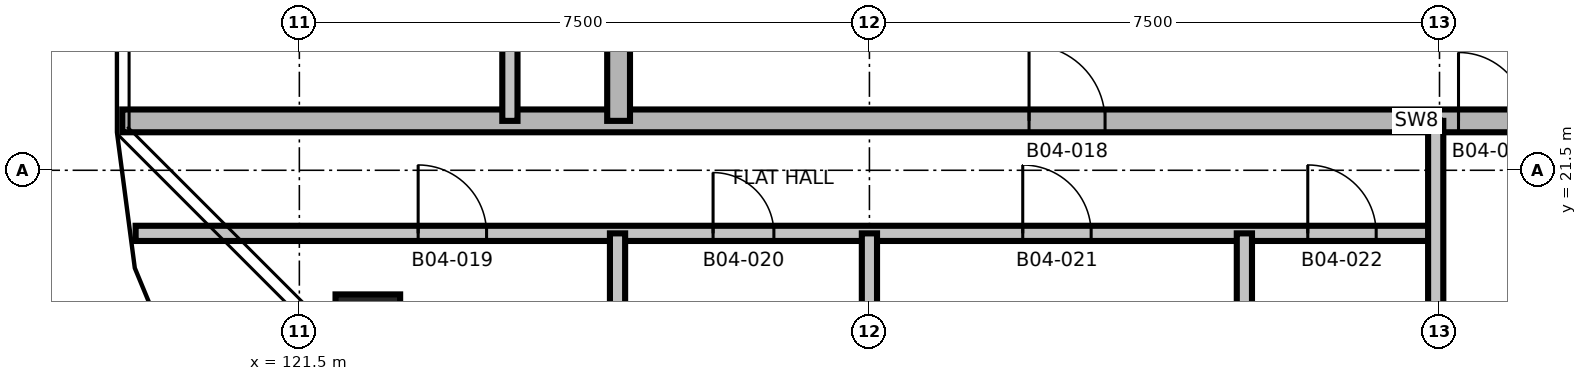
"""IFC4 building model, lengths in metres.
Left out: names, types, materials, properties, quantities, classifications, styles, units other than length and angle.
Written with IfcOpenShell. Run it as: python <this file> out.ifc"""

import sys

from ifc_helpers import new_model, si_unit, direction, frame, frame_2d, origin, origin_2d, place, context, subcontext, project, spatial, rectangle, extrude, element, fill, save


model = new_model("IFC4")
c1 = context("Model", 3, precision=1e-05, world=origin(), true_north=direction((0.0, 1.0)))
c2 = subcontext(c1, "Body", "Model", "MODEL_VIEW")
j1 = project(units=[si_unit("LENGTHUNIT", "METRE"), si_unit("PLANEANGLEUNIT", "RADIAN")], contexts=[c1])
p1 = place(None, origin())
s1 = spatial("IfcSite", under=j1, at=p1, CompositionType="ELEMENT")
p2 = place(p1, origin())
s2 = spatial("IfcBuilding", under=s1, at=p2, CompositionType="ELEMENT")
p3 = place(p2, frame((0.0, 0.0, 66.8)))
s3 = spatial("IfcBuildingStorey", under=s2, at=p3, CompositionType="ELEMENT", Elevation=66.8)
p4 = place(p3, frame((122.401, 19.442, 0.0), z_axis=(0.0, 0.0, 1.0), x_axis=(1.0, 0.0, 0.0)))
e1 = element("IfcColumn", 1, at=p4, inside=s3, PredefinedType="COLUMN", context=c2, shape_type="SweptSolid", body=[
    extrude(rectangle(XDim=0.85, YDim=0.85, at=origin_2d()), origin(), (0.0, 0.0, 1.0), 3.7),
])
p5 = place(p3, frame((119.346, 20.67, 0.0), z_axis=(0.0, 0.0, 1.0), x_axis=(1.0, 0.0, 0.0)))
e2 = element("IfcWall", 2, at=p5, inside=s3, PredefinedType="PARTITIONING", context=c2, shape_type="SweptSolid", body=[
    extrude(rectangle(XDim=17.154, YDim=0.2, at=frame_2d((8.577, 0.0))), origin(), (0.0, 0.0, 1.0), 3.4),
])
p6 = place(p5, frame((3.717, 0.0, 0.0)))
e3 = element("IfcOpeningElement", 3, at=p6, cuts=e2, PredefinedType="OPENING", context=c2, shape_type="SweptSolid", body=[
    extrude(rectangle(XDim=0.9, YDim=2.1, at=frame_2d((0.45, 1.05))), frame((0.0, 0.11, 0.0), z_axis=(0.0, -1.0, 0.0), x_axis=(1.0, 0.0, 0.0)), (0.0, 0.0, 1.0), 0.22),
])
p7 = place(p5, frame((7.597, 0.0, 0.0)))
e4 = element("IfcOpeningElement", 4, at=p7, cuts=e2, PredefinedType="OPENING", context=c2, shape_type="SweptSolid", body=[
    extrude(rectangle(XDim=0.8, YDim=2.1, at=frame_2d((0.4, 1.05))), frame((0.0, 0.11, 0.0), z_axis=(0.0, -1.0, 0.0), x_axis=(1.0, 0.0, 0.0)), (0.0, 0.0, 1.0), 0.22),
])
p8 = place(p5, frame((11.671, 0.0, 0.0)))
e5 = element("IfcOpeningElement", 5, at=p8, cuts=e2, PredefinedType="OPENING", context=c2, shape_type="SweptSolid", body=[
    extrude(rectangle(XDim=0.9, YDim=2.1, at=frame_2d((0.45, 1.05))), frame((0.0, 0.11, 0.0), z_axis=(0.0, -1.0, 0.0), x_axis=(1.0, 0.0, 0.0)), (0.0, 0.0, 1.0), 0.22),
])
p9 = place(p5, frame((15.421, 0.0, 0.0)))
e6 = element("IfcOpeningElement", 6, at=p9, cuts=e2, PredefinedType="OPENING", context=c2, shape_type="SweptSolid", body=[
    extrude(rectangle(XDim=0.9, YDim=2.1, at=frame_2d((0.45, 1.05))), frame((0.0, 0.11, 0.0), z_axis=(0.0, -1.0, 0.0), x_axis=(1.0, 0.0, 0.0)), (0.0, 0.0, 1.0), 0.22),
])
p10 = place(p3, frame((119.17, 22.15, 0.0), z_axis=(0.0, 0.0, 1.0), x_axis=(1.0, 0.0, 0.0)))
e7 = element("IfcWall", 7, at=p10, inside=s3, PredefinedType="SHEAR", context=c2, shape_type="SweptSolid", body=[
    extrude(rectangle(XDim=34.66, YDim=0.3, at=frame_2d((17.33, 0.0))), origin(), (0.0, 0.0, 1.0), 3.4),
])
p11 = place(p10, frame((23.58, 0.0, 0.0)))
e8 = element("IfcOpeningElement", 8, at=p11, cuts=e7, PredefinedType="OPENING", context=c2, shape_type="SweptSolid", body=[
    extrude(rectangle(XDim=1.0, YDim=2.1, at=frame_2d((0.5, 1.05))), frame((0.0, 0.16, 0.0), z_axis=(0.0, -1.0, 0.0), x_axis=(1.0, 0.0, 0.0)), (0.0, 0.0, 1.0), 0.32),
])
p12 = place(p10, frame((11.93, 0.0, 0.0)))
e9 = element("IfcOpeningElement", 9, at=p12, cuts=e7, PredefinedType="OPENING", context=c2, shape_type="SweptSolid", body=[
    extrude(rectangle(XDim=1.0, YDim=2.1, at=frame_2d((0.5, 1.05))), frame((0.0, 0.16, 0.0), z_axis=(0.0, -1.0, 0.0), x_axis=(1.0, 0.0, 0.0)), (0.0, 0.0, 1.0), 0.32),
])
p13 = place(p10, frame((25.48, 0.0, 0.0)))
e10 = element("IfcOpeningElement", 10, at=p13, cuts=e7, PredefinedType="OPENING", context=c2, shape_type="SweptSolid", body=[
    extrude(rectangle(XDim=1.0, YDim=2.1, at=frame_2d((0.5, 1.05))), frame((0.0, 0.16, 0.0), z_axis=(0.0, -1.0, 0.0), x_axis=(1.0, 0.0, 0.0)), (0.0, 0.0, 1.0), 0.32),
])
p14 = place(p10, frame((17.58, 0.0, 0.0)))
e11 = element("IfcOpeningElement", 11, at=p14, cuts=e7, PredefinedType="OPENING", context=c2, shape_type="SweptSolid", body=[
    extrude(rectangle(XDim=0.9, YDim=2.1, at=frame_2d((0.45, 1.05))), frame((0.0, 0.16, 0.0), z_axis=(0.0, -1.0, 0.0), x_axis=(1.0, 0.0, 0.0)), (0.0, 0.0, 1.0), 0.32),
])
p15 = place(p3, frame((124.27, 22.15, 0.0), z_axis=(0.0, 0.0, 1.0), x_axis=(0.0, 1.0, 0.0)))
e12 = element("IfcWall", 12, at=p15, inside=s3, PredefinedType="PARTITIONING", context=c2, shape_type="SweptSolid", body=[
    extrude(rectangle(XDim=17.7, YDim=0.2, at=frame_2d((8.85, 0.0))), origin(), (0.0, 0.0, 1.0), 3.4),
])
p16 = place(p15, frame((1.725, 0.0, 0.0)))
e13 = element("IfcOpeningElement", 13, at=p16, cuts=e12, PredefinedType="OPENING", context=c2, shape_type="SweptSolid", body=[
    extrude(rectangle(XDim=0.9, YDim=2.1, at=frame_2d((0.45, 1.05))), frame((0.0, 0.11, 0.0), z_axis=(0.0, -1.0, 0.0), x_axis=(1.0, 0.0, 0.0)), (0.0, 0.0, 1.0), 0.22),
])
p17 = place(p15, frame((6.867, 0.0, 0.0)))
e14 = element("IfcOpeningElement", 14, at=p17, cuts=e12, PredefinedType="OPENING", context=c2, shape_type="SweptSolid", body=[
    extrude(rectangle(XDim=0.9, YDim=2.1, at=frame_2d((0.45, 1.05))), frame((0.0, 0.11, 0.0), z_axis=(0.0, -1.0, 0.0), x_axis=(1.0, 0.0, 0.0)), (0.0, 0.0, 1.0), 0.22),
])
p18 = place(p15, frame((11.367, 0.0, 0.0)))
e15 = element("IfcOpeningElement", 15, at=p18, cuts=e12, PredefinedType="OPENING", context=c2, shape_type="SweptSolid", body=[
    extrude(rectangle(XDim=0.9, YDim=2.1, at=frame_2d((0.45, 1.05))), frame((0.0, 0.11, 0.0), z_axis=(0.0, -1.0, 0.0), x_axis=(1.0, 0.0, 0.0)), (0.0, 0.0, 1.0), 0.22),
])
p19 = place(p15, frame((14.378, 0.0, 0.0)))
e16 = element("IfcOpeningElement", 16, at=p19, cuts=e12, PredefinedType="OPENING", context=c2, shape_type="SweptSolid", body=[
    extrude(rectangle(XDim=0.9, YDim=2.1, at=frame_2d((0.45, 1.05))), frame((0.0, 0.11, 0.0), z_axis=(0.0, -1.0, 0.0), x_axis=(1.0, 0.0, 0.0)), (0.0, 0.0, 1.0), 0.22),
])
p20 = place(p15, frame((16.603, 0.0, 0.0)))
e17 = element("IfcOpeningElement", 17, at=p20, cuts=e12, PredefinedType="OPENING", context=c2, shape_type="SweptSolid", body=[
    extrude(rectangle(XDim=0.8, YDim=2.1, at=frame_2d((0.4, 1.05))), frame((0.0, 0.11, 0.0), z_axis=(0.0, -1.0, 0.0), x_axis=(1.0, 0.0, 0.0)), (0.0, 0.0, 1.0), 0.22),
])
p21 = place(p3, frame((125.686, 15.212, 0.0), z_axis=(0.0, 0.0, 1.0), x_axis=(0.0, 1.0, 0.0)))
e18 = element("IfcWall", 18, at=p21, inside=s3, PredefinedType="PARTITIONING", context=c2, shape_type="SweptSolid", body=[
    extrude(rectangle(XDim=5.458, YDim=0.2, at=frame_2d((2.729, 0.0))), origin(), (0.0, 0.0, 1.0), 3.4),
])
p22 = place(p3, frame((125.7, 22.15, 0.0), z_axis=(0.0, 0.0, 1.0), x_axis=(0.0, 1.0, 0.0)))
e19 = element("IfcWall", 19, at=p22, inside=s3, PredefinedType="SHEAR", context=c2, shape_type="SweptSolid", body=[
    extrude(rectangle(XDim=17.7, YDim=0.3, at=frame_2d((8.85, 0.0))), origin(), (0.0, 0.0, 1.0), 3.4),
])
p23 = place(p22, frame((2.7, 0.0, 0.0)))
e20 = element("IfcOpeningElement", 20, at=p23, cuts=e19, PredefinedType="OPENING", context=c2, shape_type="SweptSolid", body=[
    extrude(rectangle(XDim=1.0, YDim=2.1, at=frame_2d((0.5, 1.05))), frame((0.0, 0.16, 0.0), z_axis=(0.0, -1.0, 0.0), x_axis=(1.0, 0.0, 0.0)), (0.0, 0.0, 1.0), 0.32),
])
for number, where, z_axis, x_axis in (
    (21, (129.0, 15.17, 0.0), (0.0, 0.0, 1.0), (0.0, 1.0, 0.0)),
    (22, (133.933, 15.17, 0.0), (0.0, 0.0, 1.0), (0.0, 1.0, 0.0)),
):
    element("IfcWall", number, at=place(p3, frame(where, z_axis=z_axis, x_axis=x_axis)), inside=s3, PredefinedType="PARTITIONING", context=c2, shape_type="SweptSolid", body=[
        extrude(rectangle(XDim=5.5, YDim=0.2, at=frame_2d((2.75, 0.0))), origin(), (0.0, 0.0, 1.0), 3.4),
    ])
p24 = place(p3, frame((136.45, 15.17, 0.0), z_axis=(0.0, 0.0, 1.0), x_axis=(0.0, 1.0, 0.0)))
e23 = element("IfcWall", 23, at=p24, inside=s3, PredefinedType="PARTITIONING", context=c2, shape_type="SweptSolid", body=[
    extrude(rectangle(XDim=6.98, YDim=0.2, at=frame_2d((3.49, 0.0))), origin(), (0.0, 0.0, 1.0), 3.4),
])
p25 = place(p12, origin())
e24 = element("IfcDoor", 24, at=p25, inside=s3, OperationType="SINGLE_SWING_RIGHT", PredefinedType="DOOR", context=c2, shape_type="SweptSolid", body=[
    extrude(rectangle(XDim=1.0, YDim=2.1, at=frame_2d((0.5, 1.05))), frame((0.0, 0.025, 0.0), z_axis=(0.0, -1.0, 0.0), x_axis=(1.0, 0.0, 0.0)), (0.0, 0.0, 1.0), 0.05),
])
fill(e9, e24)
p26 = place(p6, origin())
e25 = element("IfcDoor", 25, at=p26, inside=s3, OperationType="SINGLE_SWING_LEFT", PredefinedType="DOOR", context=c2, shape_type="SweptSolid", body=[
    extrude(rectangle(XDim=0.9, YDim=2.1, at=frame_2d((0.45, 1.05))), frame((0.0, 0.025, 0.0), z_axis=(0.0, -1.0, 0.0), x_axis=(1.0, 0.0, 0.0)), (0.0, 0.0, 1.0), 0.05),
])
fill(e3, e25)
p27 = place(p7, origin())
e26 = element("IfcDoor", 26, at=p27, inside=s3, OperationType="SINGLE_SWING_RIGHT", PredefinedType="DOOR", context=c2, shape_type="SweptSolid", body=[
    extrude(rectangle(XDim=0.8, YDim=2.1, at=frame_2d((0.4, 1.05))), frame((0.0, 0.025, 0.0), z_axis=(0.0, -1.0, 0.0), x_axis=(1.0, 0.0, 0.0)), (0.0, 0.0, 1.0), 0.05),
])
fill(e4, e26)
p28 = place(p8, origin())
e27 = element("IfcDoor", 27, at=p28, inside=s3, OperationType="SINGLE_SWING_LEFT", PredefinedType="DOOR", context=c2, shape_type="SweptSolid", body=[
    extrude(rectangle(XDim=0.9, YDim=2.1, at=frame_2d((0.45, 1.05))), frame((0.0, 0.025, 0.0), z_axis=(0.0, -1.0, 0.0), x_axis=(1.0, 0.0, 0.0)), (0.0, 0.0, 1.0), 0.05),
])
fill(e5, e27)
p29 = place(p9, origin())
e28 = element("IfcDoor", 28, at=p29, inside=s3, OperationType="SINGLE_SWING_RIGHT", PredefinedType="DOOR", context=c2, shape_type="SweptSolid", body=[
    extrude(rectangle(XDim=0.9, YDim=2.1, at=frame_2d((0.45, 1.05))), frame((0.0, 0.025, 0.0), z_axis=(0.0, -1.0, 0.0), x_axis=(1.0, 0.0, 0.0)), (0.0, 0.0, 1.0), 0.05),
])
fill(e6, e28)
p30 = place(p14, origin())
e29 = element("IfcDoor", 29, at=p30, inside=s3, OperationType="SINGLE_SWING_LEFT", PredefinedType="DOOR", context=c2, shape_type="SweptSolid", body=[
    extrude(rectangle(XDim=0.9, YDim=2.1, at=frame_2d((0.45, 1.05))), frame((0.0, 0.025, 0.0), z_axis=(0.0, -1.0, 0.0), x_axis=(1.0, 0.0, 0.0)), (0.0, 0.0, 1.0), 0.05),
])
fill(e11, e29)
save(model, sys.argv[1])
